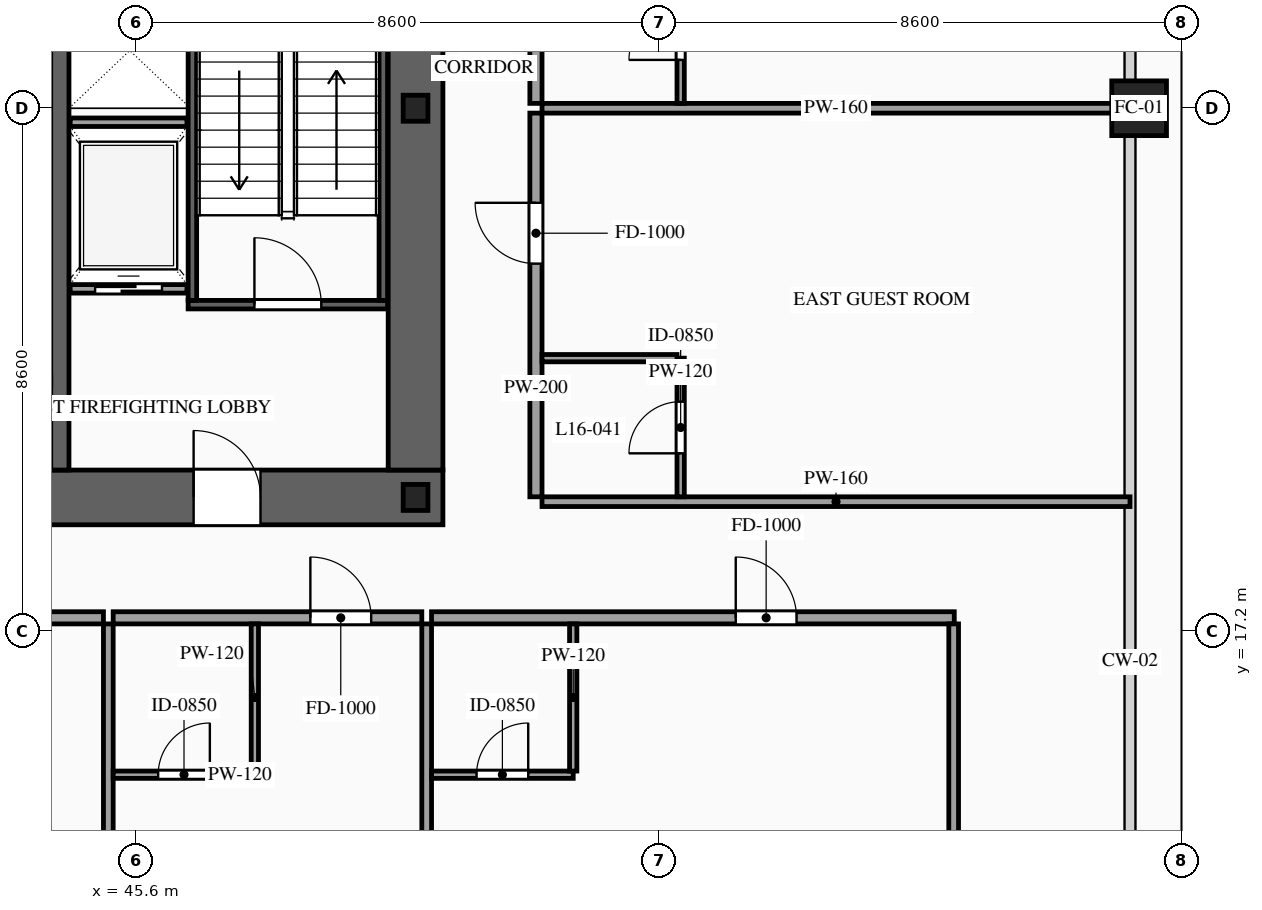
"""IFC4 building model, lengths in metres.
Left out: names, types, materials, properties, quantities, classifications, styles, units other than length and angle.
Written with IfcOpenShell. Run it as: python <this file> out.ifc"""

import sys

from ifc_helpers import new_model, si_unit, direction, frame, frame_2d, origin, origin_2d, place, context, subcontext, project, spatial, rectangle, hollow_rectangle, i_section, extrude, source, transform, mapped, element, fill, save


model = new_model("IFC4")
c1 = context("Model", 3, precision=1e-05, world=origin(), true_north=direction((0.0, 1.0)))
c2 = subcontext(c1, "Body", "Model", "MODEL_VIEW")
j1 = project(units=[si_unit("LENGTHUNIT", "METRE"), si_unit("PLANEANGLEUNIT", "RADIAN")], contexts=[c1])
p1 = place(None, origin())
s1 = spatial("IfcSite", under=j1, at=p1, CompositionType="ELEMENT")
p2 = place(p1, origin())
s2 = spatial("IfcBuilding", under=s1, at=p2, CompositionType="ELEMENT")
p3 = place(p2, frame((0.0, 0.0, 64.0)))
s3 = spatial("IfcBuildingStorey", under=s2, at=p3, CompositionType="ELEMENT", Elevation=64.0)
p4 = place(p3, frame((23.35, 19.4, 0.0), z_axis=(0.0, 0.0, 1.0), x_axis=(1.0, 0.0, 0.0)))
e1 = element("IfcWall", 1, at=p4, inside=s3, PredefinedType="SHEAR", context=c2, shape_type="SweptSolid", body=[
    extrude(rectangle(XDim=27.3, YDim=0.9, at=frame_2d((13.65, 0.0))), origin(), (0.0, 0.0, 1.0), 3.6),
])
p5 = place(p4, frame((2.1, 0.0, 0.0)))
e2 = element("IfcOpeningElement", 2, at=p5, cuts=e1, PredefinedType="OPENING", context=c2, shape_type="SweptSolid", body=[
    extrude(rectangle(XDim=1.1, YDim=2.2, at=frame_2d((0.55, 1.1))), frame((0.0, 0.465, 0.0), z_axis=(0.0, -1.0, 0.0), x_axis=(1.0, 0.0, 0.0)), (0.0, 0.0, 1.0), 0.93),
])
p6 = place(p4, frame((10.0, 0.0, 0.0)))
e3 = element("IfcOpeningElement", 3, at=p6, cuts=e1, PredefinedType="OPENING", context=c2, shape_type="SweptSolid", body=[
    extrude(rectangle(XDim=1.1, YDim=2.2, at=frame_2d((0.55, 1.1))), frame((0.0, 0.465, 0.0), z_axis=(0.0, -1.0, 0.0), x_axis=(1.0, 0.0, 0.0)), (0.0, 0.0, 1.0), 0.93),
])
p7 = place(p4, frame((23.2, 0.0, 0.0)))
e4 = element("IfcOpeningElement", 4, at=p7, cuts=e1, PredefinedType="OPENING", context=c2, shape_type="SweptSolid", body=[
    extrude(rectangle(XDim=1.1, YDim=2.2, at=frame_2d((0.55, 1.1))), frame((0.0, 0.465, 0.0), z_axis=(0.0, -1.0, 0.0), x_axis=(1.0, 0.0, 0.0)), (0.0, 0.0, 1.0), 0.93),
])
p8 = place(p4, frame((19.82, 0.0, 0.0)))
e5 = element("IfcOpeningElement", 5, at=p8, cuts=e1, PredefinedType="OPENING", context=c2, shape_type="SweptSolid", body=[
    extrude(rectangle(XDim=0.9, YDim=2.15, at=frame_2d((0.45, 1.075))), frame((0.0, 0.465, 0.0), z_axis=(0.0, -1.0, 0.0), x_axis=(1.0, 0.0, 0.0)), (0.0, 0.0, 1.0), 0.93),
])
p9 = place(p4, frame((18.38, 0.0, 0.0)))
e6 = element("IfcOpeningElement", 6, at=p9, cuts=e1, PredefinedType="OPENING", context=c2, shape_type="SweptSolid", body=[
    extrude(rectangle(XDim=0.9, YDim=2.15, at=frame_2d((0.45, 1.075))), frame((0.0, 0.465, 0.0), z_axis=(0.0, -1.0, 0.0), x_axis=(1.0, 0.0, 0.0)), (0.0, 0.0, 1.0), 0.93),
])
m1 = source(origin(), c2, "Body", "SweptSolid", [
    extrude(rectangle(XDim=11.9, YDim=0.9, at=frame_2d((5.95, 0.0))), origin(), (0.0, 0.0, 1.0), 3.6),
])
p10 = place(p3, frame((50.2, 19.85, 0.0), z_axis=(0.0, 0.0, 1.0), x_axis=(0.0, 1.0, 0.0)))
e7 = element("IfcWall", 7, at=p10, inside=s3, PredefinedType="SHEAR", context=c2, shape_type="MappedRepresentation", body=[
    mapped(m1, transform((0.0, 0.0, 0.0), scale=1.0)),
])
m2 = source(origin(), c2, "Body", "SweptSolid", [
    extrude(rectangle(XDim=11.9, YDim=0.3, at=frame_2d((5.95, 0.0))), origin(), (0.0, 0.0, 1.0), 3.6),
])
p11 = place(p3, frame((44.35, 19.85, 0.0), z_axis=(0.0, 0.0, 1.0), x_axis=(0.0, 1.0, 0.0)))
e8 = element("IfcWall", 8, at=p11, inside=s3, PredefinedType="SOLIDWALL", context=c2, shape_type="MappedRepresentation", body=[
    mapped(m2, transform((0.0, 0.0, 0.0), scale=1.0)),
])
m3 = source(origin(), c2, "Body", "SweptSolid", [
    extrude(i_section(OverallWidth=0.407, OverallDepth=0.428, WebThickness=0.02, FlangeThickness=0.035, at=origin_2d()), origin(), (0.0, 0.0, 1.0), 3.6),
])
for number, where, z_axis, x_axis in (
    (9, (50.2, 19.4, 0.0), (0.0, 0.0, 1.0), (1.0, 0.0, 0.0)),
    (10, (50.2, 25.8, 0.0), (0.0, 0.0, 1.0), (1.0, 0.0, 0.0)),
):
    element("IfcColumn", number, at=place(p3, frame(where, z_axis=z_axis, x_axis=x_axis)), inside=s3, PredefinedType="COLUMN", context=c2, shape_type="MappedRepresentation", body=[
        mapped(m3, transform((0.0, 0.0, 0.0), scale=1.0)),
    ])
m4 = source(origin(), c2, "Body", "SweptSolid", [
    extrude(hollow_rectangle(XDim=0.9, YDim=0.9, WallThickness=0.042, at=origin_2d()), origin(), (0.0, 0.0, 1.0), 3.6),
])
p12 = place(p3, frame((62.1, 25.8, 0.0), z_axis=(0.0, 0.0, 1.0), x_axis=(1.0, 0.0, 0.0)))
e11 = element("IfcColumn", 11, at=p12, inside=s3, PredefinedType="COLUMN", context=c2, shape_type="MappedRepresentation", body=[
    mapped(m4, transform((0.0, 0.0, 0.0), scale=1.0)),
])
p13 = place(p3, frame((44.52, 22.83, 0.0), z_axis=(0.0, 0.0, 1.0), x_axis=(1.0, 0.0, 0.0)))
e12 = element("IfcWall", 12, at=p13, inside=s3, PredefinedType="SOLIDWALL", context=c2, shape_type="SweptSolid", body=[
    extrude(rectangle(XDim=1.92, YDim=0.14, at=frame_2d((0.96, 0.0))), origin(), (0.0, 0.0, 1.0), 3.38),
])
p14 = place(p13, frame((0.41, 0.0, 0.0)))
e13 = element("IfcOpeningElement", 13, at=p14, cuts=e12, PredefinedType="OPENING", context=c2, shape_type="SweptSolid", body=[
    extrude(rectangle(XDim=1.1, YDim=2.2, at=frame_2d((0.55, 1.1))), frame((0.0, 0.085, 0.0), z_axis=(0.0, -1.0, 0.0), x_axis=(1.0, 0.0, 0.0)), (0.0, 0.0, 1.0), 0.17),
])
m5 = source(origin(), c2, "Body", "SweptSolid", [
    extrude(rectangle(XDim=1.92, YDim=0.14, at=frame_2d((0.96, 0.0))), origin(), (0.0, 0.0, 1.0), 3.38),
])
p15 = place(p3, frame((44.52, 25.57, 0.0), z_axis=(0.0, 0.0, 1.0), x_axis=(1.0, 0.0, 0.0)))
e14 = element("IfcWall", 14, at=p15, inside=s3, PredefinedType="SOLIDWALL", context=c2, shape_type="MappedRepresentation", body=[
    mapped(m5, transform((0.0, 0.0, 0.0), scale=1.0)),
])
p16 = place(p3, frame((46.46, 22.57, 0.0), z_axis=(0.0, 0.0, 1.0), x_axis=(1.0, 0.0, 0.0)))
e15 = element("IfcWall", 15, at=p16, inside=s3, PredefinedType="SOLIDWALL", context=c2, shape_type="SweptSolid", body=[
    extrude(rectangle(XDim=3.28, YDim=0.14, at=frame_2d((1.64, 0.0))), origin(), (0.0, 0.0, 1.0), 3.38),
])
p17 = place(p16, frame((1.09, 0.0, 0.0)))
e16 = element("IfcOpeningElement", 16, at=p17, cuts=e15, PredefinedType="OPENING", context=c2, shape_type="SweptSolid", body=[
    extrude(rectangle(XDim=1.1, YDim=2.2, at=frame_2d((0.55, 1.1))), frame((0.0, 0.085, 0.0), z_axis=(0.0, -1.0, 0.0), x_axis=(1.0, 0.0, 0.0)), (0.0, 0.0, 1.0), 0.17),
])
m6 = source(origin(), c2, "Body", "SweptSolid", [
    extrude(rectangle(XDim=8.94, YDim=0.14, at=frame_2d((4.47, 0.0))), origin(), (0.0, 0.0, 1.0), 3.38),
])
for number, where, z_axis, x_axis in (
    (17, (46.53, 22.64, 0.0), (0.0, 0.0, 1.0), (0.0, 1.0, 0.0)),
    (18, (49.67, 22.64, 0.0), (0.0, 0.0, 1.0), (0.0, 1.0, 0.0)),
):
    element("IfcWall", number, at=place(p3, frame(where, z_axis=z_axis, x_axis=x_axis)), inside=s3, PredefinedType="SOLIDWALL", context=c2, shape_type="MappedRepresentation", body=[
        mapped(m6, transform((0.0, 0.0, 0.0), scale=1.0)),
    ])
p18 = place(p3, frame((35.756, 17.42, 0.0), z_axis=(0.0, 0.0, 1.0), x_axis=(1.0, 0.0, 0.0)))
e19 = element("IfcWall", 19, at=p18, inside=s3, PredefinedType="PARTITIONING", context=c2, shape_type="SweptSolid", body=[
    extrude(rectangle(XDim=9.311, YDim=0.2, at=frame_2d((4.655, 0.0))), origin(), (0.0, 0.0, 1.0), 3.38),
])
p19 = place(p18, frame((5.361, 0.0, 0.0)))
e20 = element("IfcOpeningElement", 20, at=p19, cuts=e19, PredefinedType="OPENING", context=c2, shape_type="SweptSolid", body=[
    extrude(rectangle(XDim=1.0, YDim=2.2, at=frame_2d((0.5, 1.1))), frame((0.0, 0.115, 0.0), z_axis=(0.0, -1.0, 0.0), x_axis=(1.0, 0.0, 0.0)), (0.0, 0.0, 1.0), 0.23),
])
m7 = source(origin(), c2, "Body", "SweptSolid", [
    extrude(rectangle(XDim=16.47, YDim=0.16, at=frame_2d((8.235, 0.0))), origin(), (0.0, 0.0, 1.0), 3.38),
])
p20 = place(p3, frame((45.147, 0.85, 0.0), z_axis=(0.0, 0.0, 1.0), x_axis=(0.0, 1.0, 0.0)))
e21 = element("IfcWall", 21, at=p20, inside=s3, PredefinedType="PARTITIONING", context=c2, shape_type="MappedRepresentation", body=[
    mapped(m7, transform((0.0, 0.0, 0.0), scale=1.0)),
])
p21 = place(p3, frame((45.227, 17.42, 0.0), z_axis=(0.0, 0.0, 1.0), x_axis=(1.0, 0.0, 0.0)))
e22 = element("IfcWall", 22, at=p21, inside=s3, PredefinedType="PARTITIONING", context=c2, shape_type="SweptSolid", body=[
    extrude(rectangle(XDim=5.076, YDim=0.2, at=frame_2d((2.538, 0.0))), origin(), (0.0, 0.0, 1.0), 3.38),
])
p22 = place(p21, frame((3.243, 0.0, 0.0)))
e23 = element("IfcOpeningElement", 23, at=p22, cuts=e22, PredefinedType="OPENING", context=c2, shape_type="SweptSolid", body=[
    extrude(rectangle(XDim=1.0, YDim=2.2, at=frame_2d((0.5, 1.1))), frame((0.0, 0.115, 0.0), z_axis=(0.0, -1.0, 0.0), x_axis=(1.0, 0.0, 0.0)), (0.0, 0.0, 1.0), 0.23),
])
p23 = place(p3, frame((50.383, 0.85, 0.0), z_axis=(0.0, 0.0, 1.0), x_axis=(0.0, 1.0, 0.0)))
e24 = element("IfcWall", 24, at=p23, inside=s3, PredefinedType="PARTITIONING", context=c2, shape_type="MappedRepresentation", body=[
    mapped(m7, transform((0.0, 0.0, 0.0), scale=1.0)),
])
p24 = place(p3, frame((45.227, 14.84, 0.0), z_axis=(0.0, 0.0, 1.0), x_axis=(1.0, 0.0, 0.0)))
e25 = element("IfcWall", 25, at=p24, inside=s3, PredefinedType="PARTITIONING", context=c2, shape_type="SweptSolid", body=[
    extrude(rectangle(XDim=2.33, YDim=0.12, at=frame_2d((1.165, 0.0))), origin(), (0.0, 0.0, 1.0), 3.38),
])
p25 = place(p24, frame((0.74, 0.0, 0.0)))
e26 = element("IfcOpeningElement", 26, at=p25, cuts=e25, PredefinedType="OPENING", context=c2, shape_type="SweptSolid", body=[
    extrude(rectangle(XDim=0.85, YDim=2.1, at=frame_2d((0.425, 1.05))), frame((0.0, 0.075, 0.0), z_axis=(0.0, -1.0, 0.0), x_axis=(1.0, 0.0, 0.0)), (0.0, 0.0, 1.0), 0.15),
])
m8 = source(origin(), c2, "Body", "SweptSolid", [
    extrude(rectangle(XDim=2.42, YDim=0.12, at=frame_2d((1.21, 0.0))), origin(), (0.0, 0.0, 1.0), 3.38),
])
p26 = place(p3, frame((47.557, 14.9, 0.0), z_axis=(0.0, 0.0, 1.0), x_axis=(0.0, 1.0, 0.0)))
e27 = element("IfcWall", 27, at=p26, inside=s3, PredefinedType="PARTITIONING", context=c2, shape_type="MappedRepresentation", body=[
    mapped(m8, transform((0.0, 0.0, 0.0), scale=1.0)),
])
p27 = place(p3, frame((50.463, 17.42, 0.0), z_axis=(0.0, 0.0, 1.0), x_axis=(1.0, 0.0, 0.0)))
e28 = element("IfcWall", 28, at=p27, inside=s3, PredefinedType="PARTITIONING", context=c2, shape_type="SweptSolid", body=[
    extrude(rectangle(XDim=8.597, YDim=0.2, at=frame_2d((4.299, 0.0))), origin(), (0.0, 0.0, 1.0), 3.38),
])
p28 = place(p27, frame((5.003, 0.0, 0.0)))
e29 = element("IfcOpeningElement", 29, at=p28, cuts=e28, PredefinedType="OPENING", context=c2, shape_type="SweptSolid", body=[
    extrude(rectangle(XDim=1.0, YDim=2.2, at=frame_2d((0.5, 1.1))), frame((0.0, 0.115, 0.0), z_axis=(0.0, -1.0, 0.0), x_axis=(1.0, 0.0, 0.0)), (0.0, 0.0, 1.0), 0.23),
])
m9 = source(origin(), c2, "Body", "SweptSolid", [
    extrude(rectangle(XDim=16.32, YDim=0.16, at=frame_2d((8.16, 0.0))), origin(), (0.0, 0.0, 1.0), 3.38),
])
p29 = place(p3, frame((59.05, 1.0, 0.0), z_axis=(0.0, 0.0, 1.0), x_axis=(0.0, 1.0, 0.0)))
e30 = element("IfcWall", 30, at=p29, inside=s3, PredefinedType="PARTITIONING", context=c2, shape_type="MappedRepresentation", body=[
    mapped(m9, transform((0.0, 0.0, 0.0), scale=1.0)),
])
p30 = place(p3, frame((50.463, 14.84, 0.0), z_axis=(0.0, 0.0, 1.0), x_axis=(1.0, 0.0, 0.0)))
e31 = element("IfcWall", 31, at=p30, inside=s3, PredefinedType="PARTITIONING", context=c2, shape_type="SweptSolid", body=[
    extrude(rectangle(XDim=2.33, YDim=0.12, at=frame_2d((1.165, 0.0))), origin(), (0.0, 0.0, 1.0), 3.38),
])
p31 = place(p30, frame((0.74, 0.0, 0.0)))
e32 = element("IfcOpeningElement", 32, at=p31, cuts=e31, PredefinedType="OPENING", context=c2, shape_type="SweptSolid", body=[
    extrude(rectangle(XDim=0.85, YDim=2.1, at=frame_2d((0.425, 1.05))), frame((0.0, 0.075, 0.0), z_axis=(0.0, -1.0, 0.0), x_axis=(1.0, 0.0, 0.0)), (0.0, 0.0, 1.0), 0.15),
])
p32 = place(p3, frame((52.793, 14.9, 0.0), z_axis=(0.0, 0.0, 1.0), x_axis=(0.0, 1.0, 0.0)))
e33 = element("IfcWall", 33, at=p32, inside=s3, PredefinedType="PARTITIONING", context=c2, shape_type="MappedRepresentation", body=[
    mapped(m8, transform((0.0, 0.0, 0.0), scale=1.0)),
])
p33 = place(p3, frame((52.18, 19.41, 0.0), z_axis=(0.0, 0.0, 1.0), x_axis=(0.0, 1.0, 0.0)))
e34 = element("IfcWall", 34, at=p33, inside=s3, PredefinedType="PARTITIONING", context=c2, shape_type="SweptSolid", body=[
    extrude(rectangle(XDim=6.31, YDim=0.2, at=frame_2d((3.155, 0.0))), origin(), (0.0, 0.0, 1.0), 3.38),
])
p34 = place(p33, frame((3.835, 0.0, 0.0)))
e35 = element("IfcOpeningElement", 35, at=p34, cuts=e34, PredefinedType="OPENING", context=c2, shape_type="SweptSolid", body=[
    extrude(rectangle(XDim=1.0, YDim=2.2, at=frame_2d((0.5, 1.1))), frame((0.0, 0.115, 0.0), z_axis=(0.0, -1.0, 0.0), x_axis=(1.0, 0.0, 0.0)), (0.0, 0.0, 1.0), 0.23),
])
m10 = source(origin(), c2, "Body", "SweptSolid", [
    extrude(rectangle(XDim=9.67, YDim=0.16, at=frame_2d((4.835, 0.0))), origin(), (0.0, 0.0, 1.0), 2.575),
])
p35 = place(p3, frame((52.28, 25.8, 0.0), z_axis=(0.0, 0.0, 1.0), x_axis=(1.0, 0.0, 0.0)))
e36 = element("IfcWall", 36, at=p35, inside=s3, PredefinedType="PARTITIONING", context=c2, shape_type="MappedRepresentation", body=[
    mapped(m10, transform((0.0, 0.0, 0.0), scale=1.0)),
])
m11 = source(origin(), c2, "Body", "SweptSolid", [
    extrude(rectangle(XDim=9.67, YDim=0.16, at=frame_2d((4.835, 0.0))), origin(), (0.0, 0.0, 1.0), 2.875),
])
p36 = place(p3, frame((52.28, 19.33, 0.0), z_axis=(0.0, 0.0, 1.0), x_axis=(1.0, 0.0, 0.0)))
e37 = element("IfcWall", 37, at=p36, inside=s3, PredefinedType="PARTITIONING", context=c2, shape_type="MappedRepresentation", body=[
    mapped(m11, transform((0.0, 0.0, 0.0), scale=1.0)),
])
p37 = place(p3, frame((54.56, 19.41, 0.0), z_axis=(0.0, 0.0, 1.0), x_axis=(0.0, 1.0, 0.0)))
e38 = element("IfcWall", 38, at=p37, inside=s3, PredefinedType="PARTITIONING", context=c2, shape_type="SweptSolid", body=[
    extrude(rectangle(XDim=2.28, YDim=0.12, at=frame_2d((1.14, 0.0))), origin(), (0.0, 0.0, 1.0), 3.38),
])
p38 = place(p37, frame((0.715, 0.0, 0.0)))
e39 = element("IfcOpeningElement", 39, at=p38, cuts=e38, PredefinedType="OPENING", context=c2, shape_type="SweptSolid", body=[
    extrude(rectangle(XDim=0.85, YDim=2.1, at=frame_2d((0.425, 1.05))), frame((0.0, 0.075, 0.0), z_axis=(0.0, -1.0, 0.0), x_axis=(1.0, 0.0, 0.0)), (0.0, 0.0, 1.0), 0.15),
])
m12 = source(origin(), c2, "Body", "SweptSolid", [
    extrude(rectangle(XDim=2.22, YDim=0.12, at=frame_2d((1.11, 0.0))), origin(), (0.0, 0.0, 1.0), 3.38),
])
p39 = place(p3, frame((52.28, 21.69, 0.0), z_axis=(0.0, 0.0, 1.0), x_axis=(1.0, 0.0, 0.0)))
e40 = element("IfcWall", 40, at=p39, inside=s3, PredefinedType="PARTITIONING", context=c2, shape_type="MappedRepresentation", body=[
    mapped(m12, transform((0.0, 0.0, 0.0), scale=1.0)),
])
p40 = place(p3, frame((52.18, 25.88, 0.0), z_axis=(0.0, 0.0, 1.0), x_axis=(0.0, 1.0, 0.0)))
e41 = element("IfcWall", 41, at=p40, inside=s3, PredefinedType="PARTITIONING", context=c2, shape_type="SweptSolid", body=[
    extrude(rectangle(XDim=6.31, YDim=0.2, at=frame_2d((3.155, 0.0))), origin(), (0.0, 0.0, 1.0), 3.38),
])
p41 = place(p40, frame((3.835, 0.0, 0.0)))
e42 = element("IfcOpeningElement", 42, at=p41, cuts=e41, PredefinedType="OPENING", context=c2, shape_type="SweptSolid", body=[
    extrude(rectangle(XDim=1.0, YDim=2.2, at=frame_2d((0.5, 1.1))), frame((0.0, 0.115, 0.0), z_axis=(0.0, -1.0, 0.0), x_axis=(1.0, 0.0, 0.0)), (0.0, 0.0, 1.0), 0.23),
])
p42 = place(p3, frame((54.56, 25.88, 0.0), z_axis=(0.0, 0.0, 1.0), x_axis=(0.0, 1.0, 0.0)))
e43 = element("IfcWall", 43, at=p42, inside=s3, PredefinedType="PARTITIONING", context=c2, shape_type="SweptSolid", body=[
    extrude(rectangle(XDim=2.28, YDim=0.12, at=frame_2d((1.14, 0.0))), origin(), (0.0, 0.0, 1.0), 3.38),
])
p43 = place(p42, frame((0.715, 0.0, 0.0)))
e44 = element("IfcOpeningElement", 44, at=p43, cuts=e43, PredefinedType="OPENING", context=c2, shape_type="SweptSolid", body=[
    extrude(rectangle(XDim=0.85, YDim=2.1, at=frame_2d((0.425, 1.05))), frame((0.0, 0.075, 0.0), z_axis=(0.0, -1.0, 0.0), x_axis=(1.0, 0.0, 0.0)), (0.0, 0.0, 1.0), 0.15),
])
m13 = source(origin(), c2, "Body", "SweptSolid", [
    extrude(rectangle(XDim=1.1, YDim=2.2, at=frame_2d((0.55, 1.1))), frame((0.0, 0.025, 0.0), z_axis=(0.0, -1.0, 0.0), x_axis=(1.0, 0.0, 0.0)), (0.0, 0.0, 1.0), 0.05),
])
p44 = place(p14, origin())
e45 = element("IfcDoor", 45, at=p44, inside=s3, OperationType="SLIDING_TO_RIGHT", PredefinedType="DOOR", context=c2, shape_type="MappedRepresentation", body=[
    mapped(m13, transform((0.0, 0.0, 0.0), scale=1.0)),
])
fill(e13, e45)
m14 = source(origin(), c2, "Body", "SweptSolid", [
    extrude(rectangle(XDim=1.1, YDim=2.2, at=frame_2d((0.55, 1.1))), frame((0.0, 0.025, 0.0), z_axis=(0.0, -1.0, 0.0), x_axis=(1.0, 0.0, 0.0)), (0.0, 0.0, 1.0), 0.05),
])
p45 = place(p17, origin())
e46 = element("IfcDoor", 46, at=p45, inside=s3, OperationType="SINGLE_SWING_LEFT", PredefinedType="DOOR", context=c2, shape_type="MappedRepresentation", body=[
    mapped(m14, transform((0.0, 0.0, 0.0), scale=1.0)),
])
fill(e16, e46)
p46 = place(p7, origin())
e47 = element("IfcDoor", 47, at=p46, inside=s3, OperationType="SINGLE_SWING_LEFT", PredefinedType="DOOR", context=c2, shape_type="MappedRepresentation", body=[
    mapped(m14, transform((0.0, 0.0, 0.0), scale=1.0)),
])
fill(e4, e47)
m15 = source(origin(), c2, "Body", "SweptSolid", [
    extrude(rectangle(XDim=1.0, YDim=2.2, at=frame_2d((0.5, 1.1))), frame((0.0, 0.025, 0.0), z_axis=(0.0, -1.0, 0.0), x_axis=(1.0, 0.0, 0.0)), (0.0, 0.0, 1.0), 0.05),
])
p47 = place(p22, origin())
e48 = element("IfcDoor", 48, at=p47, inside=s3, OperationType="SINGLE_SWING_LEFT", PredefinedType="DOOR", context=c2, shape_type="MappedRepresentation", body=[
    mapped(m15, transform((0.0, 0.0, 0.0), scale=1.0)),
])
fill(e23, e48)
m16 = source(origin(), c2, "Body", "SweptSolid", [
    extrude(rectangle(XDim=0.85, YDim=2.1, at=frame_2d((0.425, 1.05))), frame((0.0, 0.025, 0.0), z_axis=(0.0, -1.0, 0.0), x_axis=(1.0, 0.0, 0.0)), (0.0, 0.0, 1.0), 0.05),
])
p48 = place(p25, origin())
e49 = element("IfcDoor", 49, at=p48, inside=s3, OperationType="SINGLE_SWING_RIGHT", PredefinedType="DOOR", context=c2, shape_type="MappedRepresentation", body=[
    mapped(m16, transform((0.0, 0.0, 0.0), scale=1.0)),
])
fill(e26, e49)
p49 = place(p28, origin())
e50 = element("IfcDoor", 50, at=p49, inside=s3, OperationType="SINGLE_SWING_LEFT", PredefinedType="DOOR", context=c2, shape_type="MappedRepresentation", body=[
    mapped(m15, transform((0.0, 0.0, 0.0), scale=1.0)),
])
fill(e29, e50)
p50 = place(p31, origin())
e51 = element("IfcDoor", 51, at=p50, inside=s3, OperationType="SINGLE_SWING_RIGHT", PredefinedType="DOOR", context=c2, shape_type="MappedRepresentation", body=[
    mapped(m16, transform((0.0, 0.0, 0.0), scale=1.0)),
])
fill(e32, e51)
p51 = place(p34, origin())
e52 = element("IfcDoor", 52, at=p51, inside=s3, OperationType="SINGLE_SWING_RIGHT", PredefinedType="DOOR", context=c2, shape_type="MappedRepresentation", body=[
    mapped(m15, transform((0.0, 0.0, 0.0), scale=1.0)),
])
fill(e35, e52)
p52 = place(p38, origin())
e53 = element("IfcDoor", 53, at=p52, inside=s3, OperationType="SINGLE_SWING_LEFT", PredefinedType="DOOR", context=c2, shape_type="MappedRepresentation", body=[
    mapped(m16, transform((0.0, 0.0, 0.0), scale=1.0)),
])
fill(e39, e53)
p53 = place(p43, origin())
e54 = element("IfcDoor", 54, at=p53, inside=s3, OperationType="SINGLE_SWING_LEFT", PredefinedType="DOOR", context=c2, shape_type="MappedRepresentation", body=[
    mapped(m16, transform((0.0, 0.0, 0.0), scale=1.0)),
])
fill(e44, e54)
save(model, sys.argv[1])
